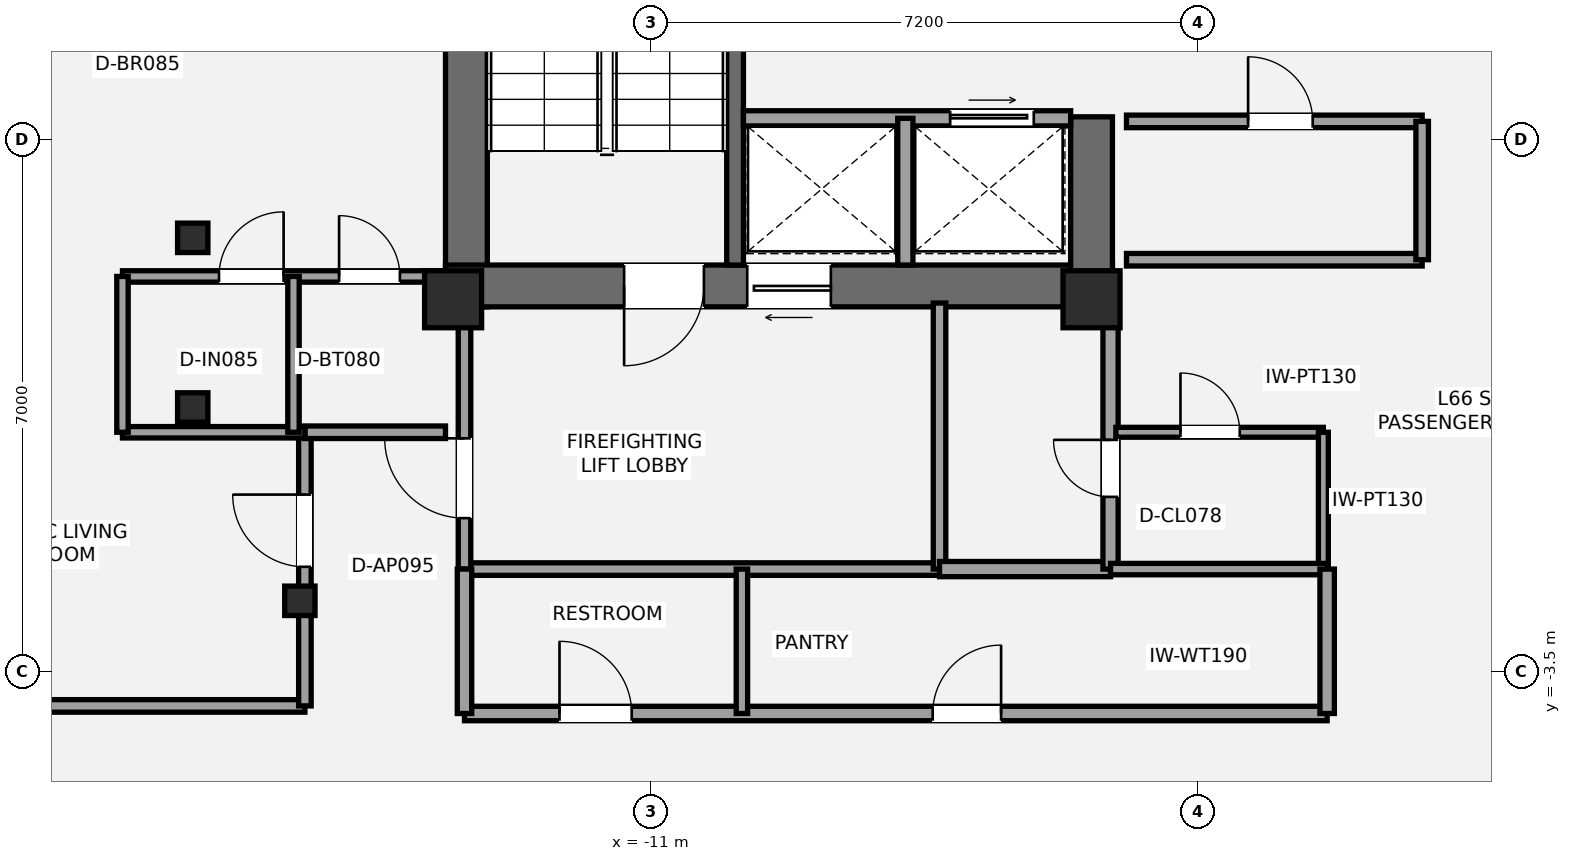
"""IFC4 building model, lengths in metres.
Left out: names, types, materials, properties, quantities, classifications, styles, units other than length and angle.
Written with IfcOpenShell. Run it as: python <this file> out.ifc"""

import sys

from ifc_helpers import new_model, si_unit, direction, frame, frame_2d, origin, origin_2d, place, context, subcontext, project, spatial, rectangle, i_section, extrude, element, fill, save


model = new_model("IFC4")
c1 = context("Model", 3, precision=1e-05, world=origin(), true_north=direction((0.0, 1.0)))
c2 = subcontext(c1, "Body", "Model", "MODEL_VIEW")
j1 = project(units=[si_unit("LENGTHUNIT", "METRE"), si_unit("PLANEANGLEUNIT", "RADIAN")], contexts=[c1])
p1 = place(None, origin())
s1 = spatial("IfcSite", under=j1, at=p1, CompositionType="ELEMENT")
p2 = place(p1, origin())
s2 = spatial("IfcBuilding", under=s1, at=p2, CompositionType="ELEMENT")
p3 = place(p2, frame((0.0, 0.0, 235.2)))
s3 = spatial("IfcBuildingStorey", under=s2, at=p3, CompositionType="ELEMENT", Elevation=235.2)
p4 = place(p3, frame((-13.425, 1.3, 0.0), z_axis=(0.0, 0.0, 1.0), x_axis=(0.0, 1.0, 0.0)))
e1 = element("IfcWall", 1, at=p4, inside=s3, PredefinedType="SHEAR", context=c2, shape_type="SweptSolid", body=[
    extrude(rectangle(XDim=8.25, YDim=0.55, at=frame_2d((4.125, 0.0))), origin(), (0.0, 0.0, 1.0), 3.15),
])
p5 = place(p3, frame((-4.925, 1.575, 0.0), z_axis=(0.0, 0.0, 1.0), x_axis=(-1.0, 0.0, 0.0)))
e2 = element("IfcWall", 2, at=p5, inside=s3, PredefinedType="SHEAR", context=c2, shape_type="SweptSolid", body=[
    extrude(rectangle(XDim=8.775, YDim=0.55, at=frame_2d((4.387, 0.0))), origin(), (0.0, 0.0, 1.0), 3.15),
])
p6 = place(p5, frame((5.375, 0.0, 0.0)))
e3 = element("IfcOpeningElement", 3, at=p6, cuts=e2, PredefinedType="OPENING", context=c2, shape_type="SweptSolid", body=[
    extrude(rectangle(XDim=1.05, YDim=2.15, at=frame_2d((0.525, 1.075))), frame((0.0, 0.285, 0.0), z_axis=(0.0, -1.0, 0.0), x_axis=(1.0, 0.0, 0.0)), (0.0, 0.0, 1.0), 0.57),
])
p7 = place(p5, frame((3.705, 0.0, 0.0)))
e4 = element("IfcOpeningElement", 4, at=p7, cuts=e2, PredefinedType="OPENING", context=c2, shape_type="SweptSolid", body=[
    extrude(rectangle(XDim=1.1, YDim=2.2, at=frame_2d((0.55, 1.1))), frame((0.0, 0.285, 0.0), z_axis=(0.0, -1.0, 0.0), x_axis=(1.0, 0.0, 0.0)), (0.0, 0.0, 1.0), 0.57),
])
p8 = place(p3, frame((-5.2, 1.3, 0.0), z_axis=(0.0, 0.0, 1.0), x_axis=(0.0, 1.0, 0.0)))
e5 = element("IfcWall", 5, at=p8, inside=s3, PredefinedType="SHEAR", context=c2, shape_type="SweptSolid", body=[
    extrude(rectangle(XDim=2.5, YDim=0.55, at=frame_2d((1.25, 0.0))), origin(), (0.0, 0.0, 1.0), 3.15),
])
p9 = place(p3, frame((-9.89, 1.85, 0.0), z_axis=(0.0, 0.0, 1.0), x_axis=(0.0, 1.0, 0.0)))
e6 = element("IfcWall", 6, at=p9, inside=s3, PredefinedType="SHEAR", context=c2, shape_type="SweptSolid", body=[
    extrude(rectangle(XDim=7.15, YDim=0.22, at=frame_2d((3.575, 0.0))), origin(), (0.0, 0.0, 1.0), 3.15),
])
for number, where, z_axis, x_axis in (
    (7, (-13.6, 1.4, 0.0), (0.0, 0.0, 1.0), (1.0, 0.0, 0.0)),
    (8, (-5.2, 1.4, 0.0), (0.0, 0.0, 1.0), (1.0, 0.0, 0.0)),
):
    element("IfcColumn", number, at=place(p3, frame(where, z_axis=z_axis, x_axis=x_axis)), inside=s3, PredefinedType="PILASTER", context=c2, shape_type="SweptSolid", body=[
        extrude(rectangle(XDim=0.75, YDim=0.75, at=origin_2d()), origin(), (0.0, 0.0, 1.0), 3.15),
    ])
for number, where, z_axis, x_axis in (
    (9, (-17.026, 2.208, 0.0), (0.0, 0.0, 1.0), (1.0, 0.0, 0.0)),
    (10, (-17.026, -0.024, 0.0), (0.0, 0.0, 1.0), (1.0, 0.0, 0.0)),
    (11, (-15.616, -2.567, 0.0), (0.0, 0.0, 1.0), (1.0, 0.0, 0.0)),
):
    element("IfcColumn", number, at=place(p3, frame(where, z_axis=z_axis, x_axis=x_axis)), inside=s3, PredefinedType="COLUMN", context=c2, shape_type="SweptSolid", body=[
        extrude(i_section(OverallWidth=0.399, OverallDepth=0.387, WebThickness=0.021, FlangeThickness=0.033, at=origin_2d()), origin(), (0.0, 0.0, 1.0), 3.15),
    ])
p10 = place(p3, frame((-13.45, -2.15, 0.0), z_axis=(0.0, 0.0, 1.0), x_axis=(1.0, 0.0, 0.0)))
e12 = element("IfcWall", 12, at=p10, inside=s3, PredefinedType="PARTITIONING", context=c2, shape_type="SweptSolid", body=[
    extrude(rectangle(XDim=6.25, YDim=0.165, at=frame_2d((3.125, 0.0))), origin(), (0.0, 0.0, 1.0), 2.423),
])
p11 = place(p3, frame((-13.45, -2.15, 0.0), z_axis=(0.0, 0.0, 1.0), x_axis=(0.0, 1.0, 0.0)))
e13 = element("IfcWall", 13, at=p11, inside=s3, PredefinedType="PARTITIONING", context=c2, shape_type="SweptSolid", body=[
    extrude(rectangle(XDim=3.5, YDim=0.165, at=frame_2d((1.75, 0.0))), origin(), (0.0, 0.0, 1.0), 2.423),
])
p12 = place(p11, frame((0.67, 0.0, 0.0)))
e14 = element("IfcOpeningElement", 14, at=p12, cuts=e13, PredefinedType="OPENING", context=c2, shape_type="SweptSolid", body=[
    extrude(rectangle(XDim=1.05, YDim=2.15, at=frame_2d((0.525, 1.075))), frame((0.0, 0.093, 0.0), z_axis=(0.0, -1.0, 0.0), x_axis=(1.0, 0.0, 0.0)), (0.0, 0.0, 1.0), 0.185),
])
p13 = place(p3, frame((-7.2, -2.15, 0.0), z_axis=(0.0, 0.0, 1.0), x_axis=(0.0, 1.0, 0.0)))
e15 = element("IfcWall", 15, at=p13, inside=s3, PredefinedType="PARTITIONING", context=c2, shape_type="SweptSolid", body=[
    extrude(rectangle(XDim=3.5, YDim=0.165, at=frame_2d((1.75, 0.0))), origin(), (0.0, 0.0, 1.0), 2.423),
])
p14 = place(p3, frame((-7.2, -2.15, 0.0), z_axis=(0.0, 0.0, 1.0), x_axis=(1.0, 0.0, 0.0)))
e16 = element("IfcWall", 16, at=p14, inside=s3, PredefinedType="SOLIDWALL", context=c2, shape_type="SweptSolid", body=[
    extrude(rectangle(XDim=2.25, YDim=0.2, at=frame_2d((1.125, 0.0))), origin(), (0.0, 0.0, 1.0), 2.97),
])
p15 = place(p3, frame((-4.95, -2.15, 0.0), z_axis=(0.0, 0.0, 1.0), x_axis=(0.0, 1.0, 0.0)))
e17 = element("IfcWall", 17, at=p15, inside=s3, PredefinedType="SOLIDWALL", context=c2, shape_type="SweptSolid", body=[
    extrude(rectangle(XDim=3.5, YDim=0.2, at=frame_2d((1.75, 0.0))), origin(), (0.0, 0.0, 1.0), 2.423),
])
p16 = place(p15, frame((0.95, 0.0, 0.0)))
e18 = element("IfcOpeningElement", 18, at=p16, cuts=e17, PredefinedType="OPENING", context=c2, shape_type="SweptSolid", body=[
    extrude(rectangle(XDim=0.75, YDim=2.1, at=frame_2d((0.375, 1.05))), frame((0.0, 0.11, 0.0), z_axis=(0.0, -1.0, 0.0), x_axis=(1.0, 0.0, 0.0)), (0.0, 0.0, 1.0), 0.22),
])
p17 = place(p3, frame((-4.88, -0.35, 0.0), z_axis=(0.0, 0.0, 1.0), x_axis=(1.0, 0.0, 0.0)))
e19 = element("IfcWall", 19, at=p17, inside=s3, PredefinedType="PARTITIONING", context=c2, shape_type="SweptSolid", body=[
    extrude(rectangle(XDim=2.73, YDim=0.13, at=frame_2d((1.365, 0.0))), origin(), (0.0, 0.0, 1.0), 2.97),
])
p18 = place(p17, frame((0.85, 0.0, 0.0)))
e20 = element("IfcOpeningElement", 20, at=p18, cuts=e19, PredefinedType="OPENING", context=c2, shape_type="SweptSolid", body=[
    extrude(rectangle(XDim=0.78, YDim=2.1, at=frame_2d((0.39, 1.05))), frame((0.0, 0.075, 0.0), z_axis=(0.0, -1.0, 0.0), x_axis=(1.0, 0.0, 0.0)), (0.0, 0.0, 1.0), 0.15),
])
p19 = place(p3, frame((-2.15, -2.15, 0.0), z_axis=(0.0, 0.0, 1.0), x_axis=(0.0, 1.0, 0.0)))
e21 = element("IfcWall", 21, at=p19, inside=s3, PredefinedType="PARTITIONING", context=c2, shape_type="SweptSolid", body=[
    extrude(rectangle(XDim=1.8, YDim=0.13, at=frame_2d((0.9, 0.0))), origin(), (0.0, 0.0, 1.0), 2.97),
])
p20 = place(p3, frame((-9.78, 3.78, 0.0), z_axis=(0.0, 0.0, 1.0), x_axis=(1.0, 0.0, 0.0)))
e22 = element("IfcWall", 22, at=p20, inside=s3, PredefinedType="SOLIDWALL", context=c2, shape_type="SweptSolid", body=[
    extrude(rectangle(XDim=4.305, YDim=0.2, at=frame_2d((2.152, 0.0))), origin(), (0.0, 0.0, 1.0), 2.97),
])
p21 = place(p20, frame((2.72, 0.0, 0.0)))
e23 = element("IfcOpeningElement", 23, at=p21, cuts=e22, PredefinedType="OPENING", context=c2, shape_type="SweptSolid", body=[
    extrude(rectangle(XDim=1.1, YDim=2.2, at=frame_2d((0.55, 1.1))), frame((0.0, 0.11, 0.0), z_axis=(0.0, -1.0, 0.0), x_axis=(1.0, 0.0, 0.0)), (0.0, 0.0, 1.0), 0.22),
])
p22 = place(p3, frame((-7.65, 1.85, 0.0), z_axis=(0.0, 0.0, 1.0), x_axis=(0.0, 1.0, 0.0)))
e24 = element("IfcWall", 24, at=p22, inside=s3, PredefinedType="SOLIDWALL", context=c2, shape_type="SweptSolid", body=[
    extrude(rectangle(XDim=1.93, YDim=0.2, at=frame_2d((0.965, 0.0))), origin(), (0.0, 0.0, 1.0), 2.97),
])
p23 = place(p3, frame((-4.74, 1.92, 0.0), z_axis=(0.0, 0.0, 1.0), x_axis=(1.0, 0.0, 0.0)))
e25 = element("IfcWall", 25, at=p23, inside=s3, PredefinedType="PARTITIONING", context=c2, shape_type="SweptSolid", body=[
    extrude(rectangle(XDim=3.89, YDim=0.165, at=frame_2d((1.945, 0.0))), origin(), (0.0, 0.0, 1.0), 2.11),
])
p24 = place(p3, frame((-4.74, 3.74, 0.0), z_axis=(0.0, 0.0, 1.0), x_axis=(1.0, 0.0, 0.0)))
e26 = element("IfcWall", 26, at=p24, inside=s3, PredefinedType="PARTITIONING", context=c2, shape_type="SweptSolid", body=[
    extrude(rectangle(XDim=3.89, YDim=0.165, at=frame_2d((1.945, 0.0))), origin(), (0.0, 0.0, 1.0), 2.97),
])
p25 = place(p24, frame((1.6, 0.0, 0.0)))
e27 = element("IfcOpeningElement", 27, at=p25, cuts=e26, PredefinedType="OPENING", context=c2, shape_type="SweptSolid", body=[
    extrude(rectangle(XDim=0.85, YDim=2.1, at=frame_2d((0.425, 1.05))), frame((0.0, 0.093, 0.0), z_axis=(0.0, -1.0, 0.0), x_axis=(1.0, 0.0, 0.0)), (0.0, 0.0, 1.0), 0.185),
])
p26 = place(p3, frame((-0.85, 1.92, 0.0), z_axis=(0.0, 0.0, 1.0), x_axis=(0.0, 1.0, 0.0)))
e28 = element("IfcWall", 28, at=p26, inside=s3, PredefinedType="PARTITIONING", context=c2, shape_type="SweptSolid", body=[
    extrude(rectangle(XDim=1.82, YDim=0.165, at=frame_2d((0.91, 0.0))), origin(), (0.0, 0.0, 1.0), 2.97),
])
p27 = place(p3, frame((-13.45, -4.05, 0.0), z_axis=(0.0, 0.0, 1.0), x_axis=(1.0, 0.0, 0.0)))
e29 = element("IfcWall", 29, at=p27, inside=s3, PredefinedType="PLUMBINGWALL", context=c2, shape_type="SweptSolid", body=[
    extrude(rectangle(XDim=11.35, YDim=0.19, at=frame_2d((5.675, 0.0))), origin(), (0.0, 0.0, 1.0), 2.357),
])
p28 = place(p27, frame((1.25, 0.0, 0.0)))
e30 = element("IfcOpeningElement", 30, at=p28, cuts=e29, PredefinedType="OPENING", context=c2, shape_type="SweptSolid", body=[
    extrude(rectangle(XDim=0.95, YDim=2.15, at=frame_2d((0.475, 1.075))), frame((0.0, 0.105, 0.0), z_axis=(0.0, -1.0, 0.0), x_axis=(1.0, 0.0, 0.0)), (0.0, 0.0, 1.0), 0.21),
])
p29 = place(p27, frame((6.16, 0.0, 0.0)))
e31 = element("IfcOpeningElement", 31, at=p29, cuts=e29, PredefinedType="OPENING", context=c2, shape_type="SweptSolid", body=[
    extrude(rectangle(XDim=0.9, YDim=2.1, at=frame_2d((0.45, 1.05))), frame((0.0, 0.105, 0.0), z_axis=(0.0, -1.0, 0.0), x_axis=(1.0, 0.0, 0.0)), (0.0, 0.0, 1.0), 0.21),
])
p30 = place(p3, frame((-4.95, -2.15, 0.0), z_axis=(0.0, 0.0, 1.0), x_axis=(1.0, 0.0, 0.0)))
e32 = element("IfcWall", 32, at=p30, inside=s3, PredefinedType="PLUMBINGWALL", context=c2, shape_type="SweptSolid", body=[
    extrude(rectangle(XDim=2.85, YDim=0.15, at=frame_2d((1.425, 0.0))), origin(), (0.0, 0.0, 1.0), 2.97),
])
for number, where, z_axis, x_axis in (
    (33, (-13.45, -4.05, 0.0), (0.0, 0.0, 1.0), (0.0, 1.0, 0.0)),
    (34, (-2.1, -4.05, 0.0), (0.0, 0.0, 1.0), (0.0, 1.0, 0.0)),
):
    element("IfcWall", number, at=place(p3, frame(where, z_axis=z_axis, x_axis=x_axis)), inside=s3, PredefinedType="PLUMBINGWALL", context=c2, shape_type="SweptSolid", body=[
        extrude(rectangle(XDim=1.9, YDim=0.19, at=frame_2d((0.95, 0.0))), origin(), (0.0, 0.0, 1.0), 2.423),
    ])
p31 = place(p3, frame((-9.8, -4.05, 0.0), z_axis=(0.0, 0.0, 1.0), x_axis=(0.0, 1.0, 0.0)))
e35 = element("IfcWall", 35, at=p31, inside=s3, PredefinedType="PLUMBINGWALL", context=c2, shape_type="SweptSolid", body=[
    extrude(rectangle(XDim=1.9, YDim=0.15, at=frame_2d((0.95, 0.0))), origin(), (0.0, 0.0, 1.0), 2.97),
])
p32 = place(p3, frame((-20.814, -3.95, 0.0), z_axis=(0.0, 0.0, 1.0), x_axis=(1.0, 0.0, 0.0)))
e36 = element("IfcWall", 36, at=p32, inside=s3, PredefinedType="PARTITIONING", context=c2, shape_type="SweptSolid", body=[
    extrude(rectangle(XDim=5.264, YDim=0.165, at=frame_2d((2.632, 0.0))), origin(), (0.0, 0.0, 1.0), 2.423),
])
p33 = place(p3, frame((-15.55, -3.95, 0.0), z_axis=(0.0, 0.0, 1.0), x_axis=(0.0, 1.0, 0.0)))
e37 = element("IfcWall", 37, at=p33, inside=s3, PredefinedType="PARTITIONING", context=c2, shape_type="SweptSolid", body=[
    extrude(rectangle(XDim=3.6, YDim=0.165, at=frame_2d((1.8, 0.0))), origin(), (0.0, 0.0, 1.0), 2.357),
])
p34 = place(p33, frame((1.83, 0.0, 0.0)))
e38 = element("IfcOpeningElement", 38, at=p34, cuts=e37, PredefinedType="OPENING", context=c2, shape_type="SweptSolid", body=[
    extrude(rectangle(XDim=0.95, YDim=2.15, at=frame_2d((0.475, 1.075))), frame((0.0, 0.093, 0.0), z_axis=(0.0, -1.0, 0.0), x_axis=(1.0, 0.0, 0.0)), (0.0, 0.0, 1.0), 0.185),
])
p35 = place(p3, frame((-15.55, -0.35, 0.0), z_axis=(0.0, 0.0, 1.0), x_axis=(1.0, 0.0, 0.0)))
e39 = element("IfcWall", 39, at=p35, inside=s3, PredefinedType="PARTITIONING", context=c2, shape_type="SweptSolid", body=[
    extrude(rectangle(XDim=1.85, YDim=0.165, at=frame_2d((0.925, 0.0))), origin(), (0.0, 0.0, 1.0), 2.97),
])
p36 = place(p3, frame((-17.95, 1.7, 0.0), z_axis=(0.0, 0.0, 1.0), x_axis=(1.0, 0.0, 0.0)))
e40 = element("IfcWall", 40, at=p36, inside=s3, PredefinedType="PLUMBINGWALL", context=c2, shape_type="SweptSolid", body=[
    extrude(rectangle(XDim=4.25, YDim=0.15, at=frame_2d((2.125, 0.0))), origin(), (0.0, 0.0, 1.0), 2.423),
])
p37 = place(p36, frame((2.85, 0.0, 0.0)))
e41 = element("IfcOpeningElement", 41, at=p37, cuts=e40, PredefinedType="OPENING", context=c2, shape_type="SweptSolid", body=[
    extrude(rectangle(XDim=0.8, YDim=2.1, at=frame_2d((0.4, 1.05))), frame((0.0, 0.085, 0.0), z_axis=(0.0, -1.0, 0.0), x_axis=(1.0, 0.0, 0.0)), (0.0, 0.0, 1.0), 0.17),
])
p38 = place(p36, frame((1.27, 0.0, 0.0)))
e42 = element("IfcOpeningElement", 42, at=p38, cuts=e40, PredefinedType="OPENING", context=c2, shape_type="SweptSolid", body=[
    extrude(rectangle(XDim=0.85, YDim=2.1, at=frame_2d((0.425, 1.05))), frame((0.0, 0.085, 0.0), z_axis=(0.0, -1.0, 0.0), x_axis=(1.0, 0.0, 0.0)), (0.0, 0.0, 1.0), 0.17),
])
p39 = place(p3, frame((-17.95, -0.35, 0.0), z_axis=(0.0, 0.0, 1.0), x_axis=(1.0, 0.0, 0.0)))
e43 = element("IfcWall", 43, at=p39, inside=s3, PredefinedType="PLUMBINGWALL", context=c2, shape_type="SweptSolid", body=[
    extrude(rectangle(XDim=2.4, YDim=0.15, at=frame_2d((1.2, 0.0))), origin(), (0.0, 0.0, 1.0), 2.423),
])
for number, where, z_axis, x_axis in (
    (44, (-15.7, -0.35, 0.0), (0.0, 0.0, 1.0), (0.0, 1.0, 0.0)),
    (45, (-17.95, -0.35, 0.0), (0.0, 0.0, 1.0), (0.0, 1.0, 0.0)),
):
    element("IfcWall", number, at=place(p3, frame(where, z_axis=z_axis, x_axis=x_axis)), inside=s3, PredefinedType="PLUMBINGWALL", context=c2, shape_type="SweptSolid", body=[
        extrude(rectangle(XDim=2.05, YDim=0.15, at=frame_2d((1.025, 0.0))), origin(), (0.0, 0.0, 1.0), 2.423),
    ])
p40 = place(p6, origin())
e46 = element("IfcDoor", 46, at=p40, inside=s3, OperationType="SINGLE_SWING_RIGHT", PredefinedType="DOOR", context=c2, shape_type="SweptSolid", body=[
    extrude(rectangle(XDim=1.05, YDim=2.15, at=frame_2d((0.525, 1.075))), frame((0.0, 0.025, 0.0), z_axis=(0.0, -1.0, 0.0), x_axis=(1.0, 0.0, 0.0)), (0.0, 0.0, 1.0), 0.05),
])
fill(e3, e46)
p41 = place(p12, origin())
e47 = element("IfcDoor", 47, at=p41, inside=s3, OperationType="SINGLE_SWING_RIGHT", PredefinedType="DOOR", context=c2, shape_type="SweptSolid", body=[
    extrude(rectangle(XDim=1.05, YDim=2.15, at=frame_2d((0.525, 1.075))), frame((0.0, 0.025, 0.0), z_axis=(0.0, -1.0, 0.0), x_axis=(1.0, 0.0, 0.0)), (0.0, 0.0, 1.0), 0.05),
])
fill(e14, e47)
p42 = place(p16, origin())
e48 = element("IfcDoor", 48, at=p42, inside=s3, OperationType="SINGLE_SWING_RIGHT", PredefinedType="DOOR", context=c2, shape_type="SweptSolid", body=[
    extrude(rectangle(XDim=0.75, YDim=2.1, at=frame_2d((0.375, 1.05))), frame((0.0, 0.025, 0.0), z_axis=(0.0, -1.0, 0.0), x_axis=(1.0, 0.0, 0.0)), (0.0, 0.0, 1.0), 0.05),
])
fill(e18, e48)
p43 = place(p18, origin())
e49 = element("IfcDoor", 49, at=p43, inside=s3, OperationType="SINGLE_SWING_LEFT", PredefinedType="DOOR", context=c2, shape_type="SweptSolid", body=[
    extrude(rectangle(XDim=0.78, YDim=2.1, at=frame_2d((0.39, 1.05))), frame((0.0, 0.025, 0.0), z_axis=(0.0, -1.0, 0.0), x_axis=(1.0, 0.0, 0.0)), (0.0, 0.0, 1.0), 0.05),
])
fill(e20, e49)
p44 = place(p7, origin())
e50 = element("IfcDoor", 50, at=p44, inside=s3, OperationType="SLIDING_TO_LEFT", PredefinedType="DOOR", context=c2, shape_type="SweptSolid", body=[
    extrude(rectangle(XDim=1.1, YDim=2.2, at=frame_2d((0.55, 1.1))), frame((0.0, 0.025, 0.0), z_axis=(0.0, -1.0, 0.0), x_axis=(1.0, 0.0, 0.0)), (0.0, 0.0, 1.0), 0.05),
])
fill(e4, e50)
p45 = place(p21, origin())
e51 = element("IfcDoor", 51, at=p45, inside=s3, OperationType="SLIDING_TO_LEFT", PredefinedType="DOOR", context=c2, shape_type="SweptSolid", body=[
    extrude(rectangle(XDim=1.1, YDim=2.2, at=frame_2d((0.55, 1.1))), frame((0.0, 0.025, 0.0), z_axis=(0.0, -1.0, 0.0), x_axis=(1.0, 0.0, 0.0)), (0.0, 0.0, 1.0), 0.05),
])
fill(e23, e51)
p46 = place(p25, origin())
e52 = element("IfcDoor", 52, at=p46, inside=s3, OperationType="SINGLE_SWING_LEFT", PredefinedType="DOOR", context=c2, shape_type="SweptSolid", body=[
    extrude(rectangle(XDim=0.85, YDim=2.1, at=frame_2d((0.425, 1.05))), frame((0.0, 0.025, 0.0), z_axis=(0.0, -1.0, 0.0), x_axis=(1.0, 0.0, 0.0)), (0.0, 0.0, 1.0), 0.05),
])
fill(e27, e52)
p47 = place(p28, origin())
e53 = element("IfcDoor", 53, at=p47, inside=s3, OperationType="SINGLE_SWING_LEFT", PredefinedType="DOOR", context=c2, shape_type="SweptSolid", body=[
    extrude(rectangle(XDim=0.95, YDim=2.15, at=frame_2d((0.475, 1.075))), frame((0.0, 0.025, 0.0), z_axis=(0.0, -1.0, 0.0), x_axis=(1.0, 0.0, 0.0)), (0.0, 0.0, 1.0), 0.05),
])
fill(e30, e53)
p48 = place(p29, origin())
e54 = element("IfcDoor", 54, at=p48, inside=s3, OperationType="SINGLE_SWING_RIGHT", PredefinedType="DOOR", context=c2, shape_type="SweptSolid", body=[
    extrude(rectangle(XDim=0.9, YDim=2.1, at=frame_2d((0.45, 1.05))), frame((0.0, 0.025, 0.0), z_axis=(0.0, -1.0, 0.0), x_axis=(1.0, 0.0, 0.0)), (0.0, 0.0, 1.0), 0.05),
])
fill(e31, e54)
p49 = place(p34, origin())
e55 = element("IfcDoor", 55, at=p49, inside=s3, OperationType="SINGLE_SWING_RIGHT", PredefinedType="DOOR", context=c2, shape_type="SweptSolid", body=[
    extrude(rectangle(XDim=0.95, YDim=2.15, at=frame_2d((0.475, 1.075))), frame((0.0, 0.025, 0.0), z_axis=(0.0, -1.0, 0.0), x_axis=(1.0, 0.0, 0.0)), (0.0, 0.0, 1.0), 0.05),
])
fill(e38, e55)
p50 = place(p37, origin())
e56 = element("IfcDoor", 56, at=p50, inside=s3, OperationType="SINGLE_SWING_LEFT", PredefinedType="DOOR", context=c2, shape_type="SweptSolid", body=[
    extrude(rectangle(XDim=0.8, YDim=2.1, at=frame_2d((0.4, 1.05))), frame((0.0, 0.025, 0.0), z_axis=(0.0, -1.0, 0.0), x_axis=(1.0, 0.0, 0.0)), (0.0, 0.0, 1.0), 0.05),
])
fill(e41, e56)
p51 = place(p38, origin())
e57 = element("IfcDoor", 57, at=p51, inside=s3, OperationType="SINGLE_SWING_RIGHT", PredefinedType="DOOR", context=c2, shape_type="SweptSolid", body=[
    extrude(rectangle(XDim=0.85, YDim=2.1, at=frame_2d((0.425, 1.05))), frame((0.0, 0.025, 0.0), z_axis=(0.0, -1.0, 0.0), x_axis=(1.0, 0.0, 0.0)), (0.0, 0.0, 1.0), 0.05),
])
fill(e42, e57)
save(model, sys.argv[1])
